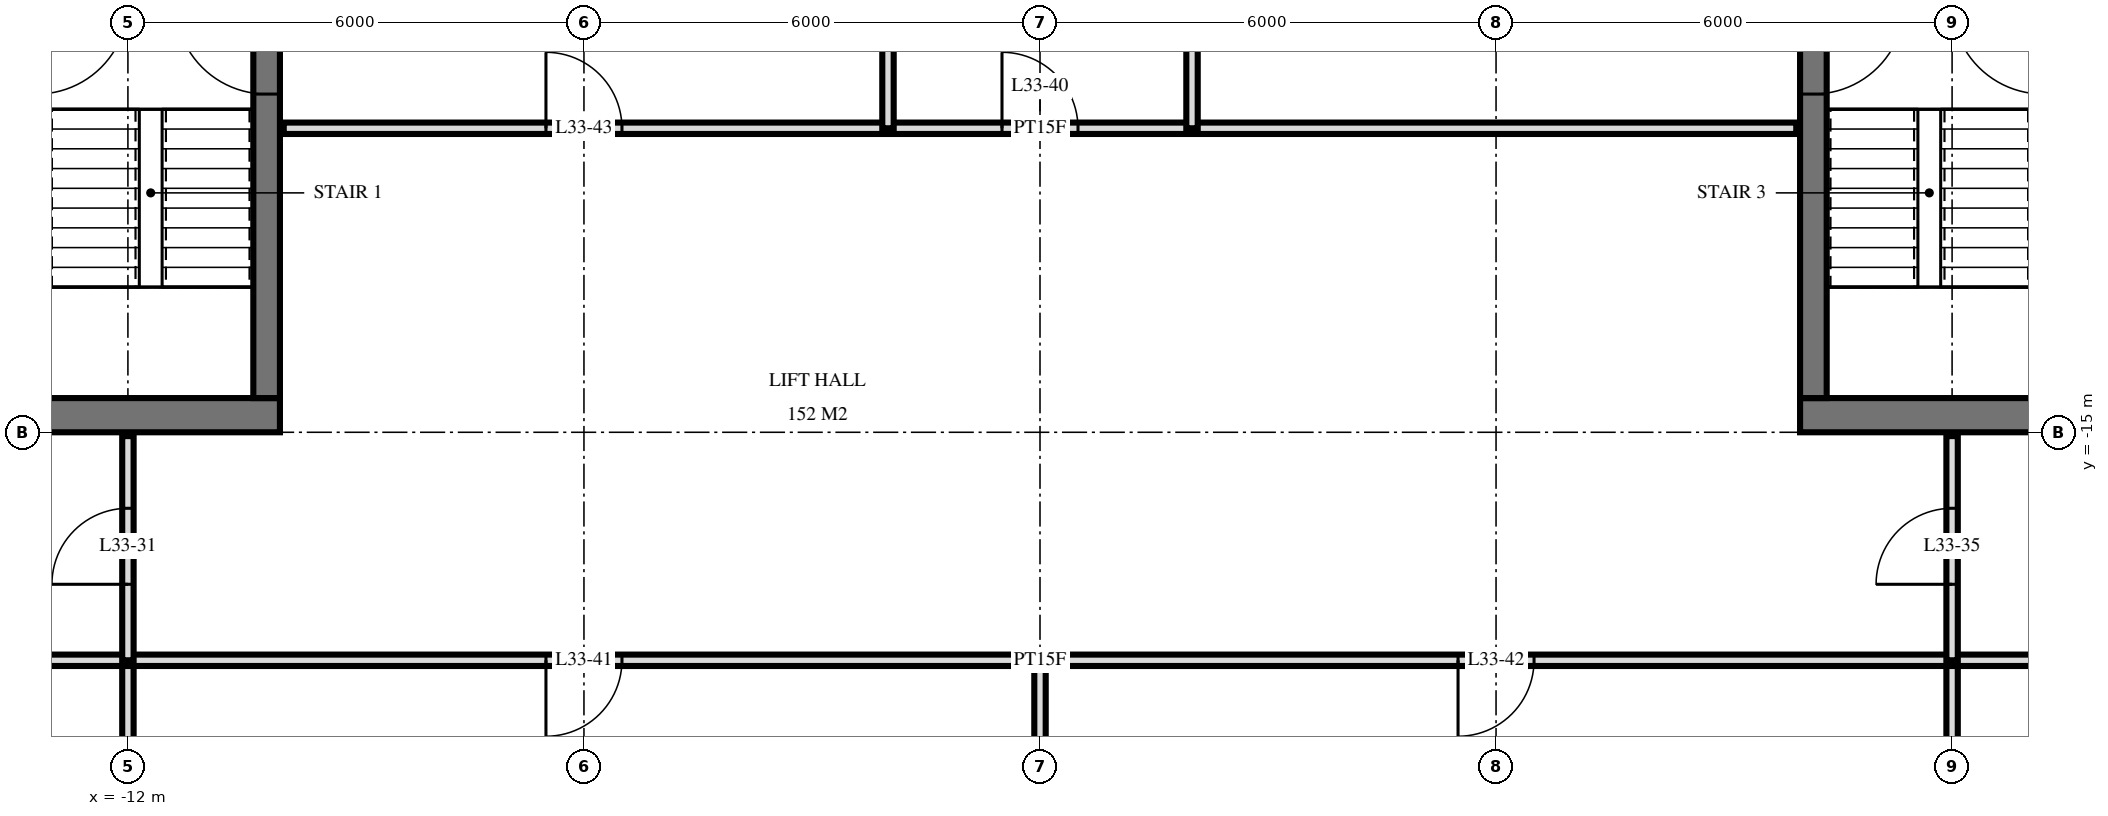
"""IFC4 building model, lengths in metres.
Left out: names, types, materials, properties, quantities, classifications, styles, units other than length and angle.
Written with IfcOpenShell. Run it as: python <this file> out.ifc"""

import sys

from ifc_helpers import new_model, si_unit, direction, frame, frame_2d, origin, place, context, subcontext, project, spatial, rectangle, extrude, element, fill, save


model = new_model("IFC4")
c1 = context("Model", 3, precision=1e-05, world=origin(), true_north=direction((0.0, 1.0)))
c2 = subcontext(c1, "Body", "Model", "MODEL_VIEW")
j1 = project(units=[si_unit("LENGTHUNIT", "METRE"), si_unit("PLANEANGLEUNIT", "RADIAN")], contexts=[c1])
p1 = place(None, origin())
s1 = spatial("IfcSite", under=j1, at=p1, CompositionType="ELEMENT")
p2 = place(p1, origin())
s2 = spatial("IfcBuilding", under=s1, at=p2, CompositionType="ELEMENT")
p3 = place(p2, frame((0.0, 0.0, 130.8)))
s3 = spatial("IfcBuildingStorey", under=s2, at=p3, CompositionType="ELEMENT", Elevation=130.8)
p4 = place(p3, frame((-24.5, -14.775, 0.0), z_axis=(0.0, 0.0, 1.0), x_axis=(1.0, 0.0, 0.0)))
e1 = element("IfcWall", 1, at=p4, inside=s3, PredefinedType="SHEAR", context=c2, shape_type="SweptSolid", body=[
    extrude(rectangle(XDim=14.5, YDim=0.45, at=frame_2d((7.25, 0.0))), origin(), (0.0, 0.0, 1.0), 3.6),
])
p5 = place(p4, frame((6.2, 0.0, 0.0)))
e2 = element("IfcOpeningElement", 2, at=p5, cuts=e1, PredefinedType="OPENING", context=c2, shape_type="SweptSolid", body=[
    extrude(rectangle(XDim=1.2, YDim=2.1, at=frame_2d((0.6, 1.05))), frame((0.0, 0.235, 0.0), z_axis=(0.0, -1.0, 0.0), x_axis=(1.0, 0.0, 0.0)), (0.0, 0.0, 1.0), 0.47),
])
p6 = place(p4, frame((9.25, 0.0, 0.0)))
e3 = element("IfcOpeningElement", 3, at=p6, cuts=e1, PredefinedType="OPENING", context=c2, shape_type="SweptSolid", body=[
    extrude(rectangle(XDim=1.1, YDim=2.1, at=frame_2d((0.55, 1.05))), frame((0.0, 0.235, 0.0), z_axis=(0.0, -1.0, 0.0), x_axis=(1.0, 0.0, 0.0)), (0.0, 0.0, 1.0), 0.47),
])
p7 = place(p4, frame((3.5, 0.0, 0.0)))
e4 = element("IfcOpeningElement", 4, at=p7, cuts=e1, PredefinedType="OPENING", context=c2, shape_type="SweptSolid", body=[
    extrude(rectangle(XDim=0.9, YDim=2.1, at=frame_2d((0.45, 1.05))), frame((0.0, 0.235, 0.0), z_axis=(0.0, -1.0, 0.0), x_axis=(1.0, 0.0, 0.0)), (0.0, 0.0, 1.0), 0.47),
])
p8 = place(p4, frame((1.05, 0.0, 0.0)))
e5 = element("IfcOpeningElement", 5, at=p8, cuts=e1, PredefinedType="OPENING", context=c2, shape_type="SweptSolid", body=[
    extrude(rectangle(XDim=1.0, YDim=2.1, at=frame_2d((0.5, 1.05))), frame((0.0, 0.235, 0.0), z_axis=(0.0, -1.0, 0.0), x_axis=(1.0, 0.0, 0.0)), (0.0, 0.0, 1.0), 0.47),
])
p9 = place(p3, frame((-10.175, -14.55, 0.0), z_axis=(0.0, 0.0, 1.0), x_axis=(0.0, 1.0, 0.0)))
e6 = element("IfcWall", 6, at=p9, inside=s3, PredefinedType="SHEAR", context=c2, shape_type="SweptSolid", body=[
    extrude(rectangle(XDim=14.1, YDim=0.35, at=frame_2d((7.05, 0.0))), origin(), (0.0, 0.0, 1.0), 3.6),
])
p10 = place(p9, frame((8.4, 0.0, 0.0)))
e7 = element("IfcOpeningElement", 7, at=p10, cuts=e6, PredefinedType="OPENING", context=c2, shape_type="SweptSolid", body=[
    extrude(rectangle(XDim=1.4, YDim=2.4, at=frame_2d((0.7, 1.2))), frame((0.0, 0.185, 0.0), z_axis=(0.0, -1.0, 0.0), x_axis=(1.0, 0.0, 0.0)), (0.0, 0.0, 1.0), 0.37),
])
p11 = place(p9, frame((10.0, 0.0, 0.0)))
e8 = element("IfcOpeningElement", 8, at=p11, cuts=e6, PredefinedType="OPENING", context=c2, shape_type="SweptSolid", body=[
    extrude(rectangle(XDim=1.4, YDim=2.4, at=frame_2d((0.7, 1.2))), frame((0.0, 0.185, 0.0), z_axis=(0.0, -1.0, 0.0), x_axis=(1.0, 0.0, 0.0)), (0.0, 0.0, 1.0), 0.37),
])
p12 = place(p9, frame((4.0, 0.0, 0.0)))
e9 = element("IfcOpeningElement", 9, at=p12, cuts=e6, PredefinedType="OPENING", context=c2, shape_type="SweptSolid", body=[
    extrude(rectangle(XDim=1.2, YDim=2.1, at=frame_2d((0.6, 1.05))), frame((0.0, 0.185, 0.0), z_axis=(0.0, -1.0, 0.0), x_axis=(1.0, 0.0, 0.0)), (0.0, 0.0, 1.0), 0.37),
])
p13 = place(p3, frame((10.0, -14.775, 0.0), z_axis=(0.0, 0.0, 1.0), x_axis=(1.0, 0.0, 0.0)))
e10 = element("IfcWall", 10, at=p13, inside=s3, PredefinedType="SHEAR", context=c2, shape_type="SweptSolid", body=[
    extrude(rectangle(XDim=14.5, YDim=0.45, at=frame_2d((7.25, 0.0))), origin(), (0.0, 0.0, 1.0), 3.6),
])
p14 = place(p13, frame((7.1, 0.0, 0.0)))
e11 = element("IfcOpeningElement", 11, at=p14, cuts=e10, PredefinedType="OPENING", context=c2, shape_type="SweptSolid", body=[
    extrude(rectangle(XDim=1.2, YDim=2.1, at=frame_2d((0.6, 1.05))), frame((0.0, 0.235, 0.0), z_axis=(0.0, -1.0, 0.0), x_axis=(1.0, 0.0, 0.0)), (0.0, 0.0, 1.0), 0.47),
])
p15 = place(p13, frame((4.15, 0.0, 0.0)))
e12 = element("IfcOpeningElement", 12, at=p15, cuts=e10, PredefinedType="OPENING", context=c2, shape_type="SweptSolid", body=[
    extrude(rectangle(XDim=1.1, YDim=2.1, at=frame_2d((0.55, 1.05))), frame((0.0, 0.235, 0.0), z_axis=(0.0, -1.0, 0.0), x_axis=(1.0, 0.0, 0.0)), (0.0, 0.0, 1.0), 0.47),
])
p16 = place(p13, frame((10.1, 0.0, 0.0)))
e13 = element("IfcOpeningElement", 13, at=p16, cuts=e10, PredefinedType="OPENING", context=c2, shape_type="SweptSolid", body=[
    extrude(rectangle(XDim=0.9, YDim=2.1, at=frame_2d((0.45, 1.05))), frame((0.0, 0.235, 0.0), z_axis=(0.0, -1.0, 0.0), x_axis=(1.0, 0.0, 0.0)), (0.0, 0.0, 1.0), 0.47),
])
p17 = place(p13, frame((12.45, 0.0, 0.0)))
e14 = element("IfcOpeningElement", 14, at=p17, cuts=e10, PredefinedType="OPENING", context=c2, shape_type="SweptSolid", body=[
    extrude(rectangle(XDim=1.0, YDim=2.1, at=frame_2d((0.5, 1.05))), frame((0.0, 0.235, 0.0), z_axis=(0.0, -1.0, 0.0), x_axis=(1.0, 0.0, 0.0)), (0.0, 0.0, 1.0), 0.47),
])
p18 = place(p3, frame((10.175, -14.55, 0.0), z_axis=(0.0, 0.0, 1.0), x_axis=(0.0, 1.0, 0.0)))
e15 = element("IfcWall", 15, at=p18, inside=s3, PredefinedType="SHEAR", context=c2, shape_type="SweptSolid", body=[
    extrude(rectangle(XDim=14.1, YDim=0.35, at=frame_2d((7.05, 0.0))), origin(), (0.0, 0.0, 1.0), 3.6),
])
p19 = place(p18, frame((8.4, 0.0, 0.0)))
e16 = element("IfcOpeningElement", 16, at=p19, cuts=e15, PredefinedType="OPENING", context=c2, shape_type="SweptSolid", body=[
    extrude(rectangle(XDim=1.4, YDim=2.4, at=frame_2d((0.7, 1.2))), frame((0.0, 0.185, 0.0), z_axis=(0.0, -1.0, 0.0), x_axis=(1.0, 0.0, 0.0)), (0.0, 0.0, 1.0), 0.37),
])
p20 = place(p18, frame((10.0, 0.0, 0.0)))
e17 = element("IfcOpeningElement", 17, at=p20, cuts=e15, PredefinedType="OPENING", context=c2, shape_type="SweptSolid", body=[
    extrude(rectangle(XDim=1.4, YDim=2.4, at=frame_2d((0.7, 1.2))), frame((0.0, 0.185, 0.0), z_axis=(0.0, -1.0, 0.0), x_axis=(1.0, 0.0, 0.0)), (0.0, 0.0, 1.0), 0.37),
])
p21 = place(p18, frame((4.0, 0.0, 0.0)))
e18 = element("IfcOpeningElement", 18, at=p21, cuts=e15, PredefinedType="OPENING", context=c2, shape_type="SweptSolid", body=[
    extrude(rectangle(XDim=1.2, YDim=2.1, at=frame_2d((0.6, 1.05))), frame((0.0, 0.185, 0.0), z_axis=(0.0, -1.0, 0.0), x_axis=(1.0, 0.0, 0.0)), (0.0, 0.0, 1.0), 0.37),
])
p22 = place(p3, frame((12.0, -18.0, 0.0), z_axis=(0.0, 0.0, 1.0), x_axis=(0.0, 1.0, 0.0)))
e19 = element("IfcWall", 19, at=p22, inside=s3, PredefinedType="PARTITIONING", context=c2, shape_type="SweptSolid", body=[
    extrude(rectangle(XDim=2.95, YDim=0.15, at=frame_2d((1.475, 0.0))), origin(), (0.0, 0.0, 1.0), 3.32),
])
p23 = place(p22, frame((1.0, 0.0, 0.0)))
e20 = element("IfcOpeningElement", 20, at=p23, cuts=e19, PredefinedType="OPENING", context=c2, shape_type="SweptSolid", body=[
    extrude(rectangle(XDim=1.0, YDim=2.1, at=frame_2d((0.5, 1.05))), frame((0.0, 0.085, 0.0), z_axis=(0.0, -1.0, 0.0), x_axis=(1.0, 0.0, 0.0)), (0.0, 0.0, 1.0), 0.17),
])
p24 = place(p3, frame((12.0, -33.62, 0.0), z_axis=(0.0, 0.0, 1.0), x_axis=(0.0, 1.0, 0.0)))
e21 = element("IfcWall", 21, at=p24, inside=s3, PredefinedType="PARTITIONING", context=c2, shape_type="SweptSolid", body=[
    extrude(rectangle(XDim=15.62, YDim=0.15, at=frame_2d((7.81, 0.0))), origin(), (0.0, 0.0, 1.0), 3.32),
])
p25 = place(p3, frame((2.0, -11.0, 0.0), z_axis=(0.0, 0.0, 1.0), x_axis=(0.0, 1.0, 0.0)))
e22 = element("IfcWall", 22, at=p25, inside=s3, PredefinedType="PARTITIONING", context=c2, shape_type="SweptSolid", body=[
    extrude(rectangle(XDim=4.0, YDim=0.15, at=frame_2d((2.0, 0.0))), origin(), (0.0, 0.0, 1.0), 3.32),
])
p26 = place(p3, frame((0.0, -33.62, 0.0), z_axis=(0.0, 0.0, 1.0), x_axis=(0.0, 1.0, 0.0)))
e23 = element("IfcWall", 23, at=p26, inside=s3, PredefinedType="PARTITIONING", context=c2, shape_type="SweptSolid", body=[
    extrude(rectangle(XDim=15.62, YDim=0.15, at=frame_2d((7.81, 0.0))), origin(), (0.0, 0.0, 1.0), 3.32),
])
p27 = place(p3, frame((-2.0, -11.0, 0.0), z_axis=(0.0, 0.0, 1.0), x_axis=(0.0, 1.0, 0.0)))
e24 = element("IfcWall", 24, at=p27, inside=s3, PredefinedType="PARTITIONING", context=c2, shape_type="SweptSolid", body=[
    extrude(rectangle(XDim=4.0, YDim=0.15, at=frame_2d((2.0, 0.0))), origin(), (0.0, 0.0, 1.0), 3.32),
])
p28 = place(p3, frame((-12.0, -18.0, 0.0), z_axis=(0.0, 0.0, 1.0), x_axis=(0.0, 1.0, 0.0)))
e25 = element("IfcWall", 25, at=p28, inside=s3, PredefinedType="PARTITIONING", context=c2, shape_type="SweptSolid", body=[
    extrude(rectangle(XDim=2.95, YDim=0.15, at=frame_2d((1.475, 0.0))), origin(), (0.0, 0.0, 1.0), 3.32),
])
p29 = place(p28, frame((1.0, 0.0, 0.0)))
e26 = element("IfcOpeningElement", 26, at=p29, cuts=e25, PredefinedType="OPENING", context=c2, shape_type="SweptSolid", body=[
    extrude(rectangle(XDim=1.0, YDim=2.1, at=frame_2d((0.5, 1.05))), frame((0.0, 0.085, 0.0), z_axis=(0.0, -1.0, 0.0), x_axis=(1.0, 0.0, 0.0)), (0.0, 0.0, 1.0), 0.17),
])
p30 = place(p3, frame((-12.0, -33.62, 0.0), z_axis=(0.0, 0.0, 1.0), x_axis=(0.0, 1.0, 0.0)))
e27 = element("IfcWall", 27, at=p30, inside=s3, PredefinedType="PARTITIONING", context=c2, shape_type="SweptSolid", body=[
    extrude(rectangle(XDim=15.62, YDim=0.15, at=frame_2d((7.81, 0.0))), origin(), (0.0, 0.0, 1.0), 3.32),
])
p31 = place(p3, frame((-28.02, -18.0, 0.0), z_axis=(0.0, 0.0, 1.0), x_axis=(1.0, 0.0, 0.0)))
e28 = element("IfcWall", 28, at=p31, inside=s3, PredefinedType="PARTITIONING", context=c2, shape_type="SweptSolid", body=[
    extrude(rectangle(XDim=56.04, YDim=0.15, at=frame_2d((28.02, 0.0))), origin(), (0.0, 0.0, 1.0), 3.32),
])
p32 = place(p31, frame((13.17, 0.0, 0.0)))
e29 = element("IfcOpeningElement", 29, at=p32, cuts=e28, PredefinedType="OPENING", context=c2, shape_type="SweptSolid", body=[
    extrude(rectangle(XDim=1.0, YDim=2.1, at=frame_2d((0.5, 1.05))), frame((0.0, 0.085, 0.0), z_axis=(0.0, -1.0, 0.0), x_axis=(1.0, 0.0, 0.0)), (0.0, 0.0, 1.0), 0.17),
])
p33 = place(p31, frame((11.32, 0.0, 0.0)))
e30 = element("IfcOpeningElement", 30, at=p33, cuts=e28, PredefinedType="OPENING", context=c2, shape_type="SweptSolid", body=[
    extrude(rectangle(XDim=1.0, YDim=2.1, at=frame_2d((0.5, 1.05))), frame((0.0, 0.085, 0.0), z_axis=(0.0, -1.0, 0.0), x_axis=(1.0, 0.0, 0.0)), (0.0, 0.0, 1.0), 0.17),
])
p34 = place(p31, frame((41.87, 0.0, 0.0)))
e31 = element("IfcOpeningElement", 31, at=p34, cuts=e28, PredefinedType="OPENING", context=c2, shape_type="SweptSolid", body=[
    extrude(rectangle(XDim=1.0, YDim=2.1, at=frame_2d((0.5, 1.05))), frame((0.0, 0.085, 0.0), z_axis=(0.0, -1.0, 0.0), x_axis=(1.0, 0.0, 0.0)), (0.0, 0.0, 1.0), 0.17),
])
p35 = place(p31, frame((43.17, 0.0, 0.0)))
e32 = element("IfcOpeningElement", 32, at=p35, cuts=e28, PredefinedType="OPENING", context=c2, shape_type="SweptSolid", body=[
    extrude(rectangle(XDim=1.0, YDim=2.1, at=frame_2d((0.5, 1.05))), frame((0.0, 0.085, 0.0), z_axis=(0.0, -1.0, 0.0), x_axis=(1.0, 0.0, 0.0)), (0.0, 0.0, 1.0), 0.17),
])
p36 = place(p31, frame((46.72, 0.0, 0.0)))
e33 = element("IfcOpeningElement", 33, at=p36, cuts=e28, PredefinedType="OPENING", context=c2, shape_type="SweptSolid", body=[
    extrude(rectangle(XDim=1.0, YDim=2.1, at=frame_2d((0.5, 1.05))), frame((0.0, 0.085, 0.0), z_axis=(0.0, -1.0, 0.0), x_axis=(1.0, 0.0, 0.0)), (0.0, 0.0, 1.0), 0.17),
])
p37 = place(p31, frame((21.52, 0.0, 0.0)))
e34 = element("IfcOpeningElement", 34, at=p37, cuts=e28, PredefinedType="OPENING", context=c2, shape_type="SweptSolid", body=[
    extrude(rectangle(XDim=1.0, YDim=2.1, at=frame_2d((0.5, 1.05))), frame((0.0, 0.085, 0.0), z_axis=(0.0, -1.0, 0.0), x_axis=(1.0, 0.0, 0.0)), (0.0, 0.0, 1.0), 0.17),
])
p38 = place(p31, frame((33.52, 0.0, 0.0)))
e35 = element("IfcOpeningElement", 35, at=p38, cuts=e28, PredefinedType="OPENING", context=c2, shape_type="SweptSolid", body=[
    extrude(rectangle(XDim=1.0, YDim=2.1, at=frame_2d((0.5, 1.05))), frame((0.0, 0.085, 0.0), z_axis=(0.0, -1.0, 0.0), x_axis=(1.0, 0.0, 0.0)), (0.0, 0.0, 1.0), 0.17),
])
p39 = place(p3, frame((-9.95, -11.0, 0.0), z_axis=(0.0, 0.0, 1.0), x_axis=(1.0, 0.0, 0.0)))
e36 = element("IfcWall", 36, at=p39, inside=s3, PredefinedType="PARTITIONING", context=c2, shape_type="SweptSolid", body=[
    extrude(rectangle(XDim=19.9, YDim=0.15, at=frame_2d((9.95, 0.0))), origin(), (0.0, 0.0, 1.0), 3.32),
])
p40 = place(p39, frame((9.45, 0.0, 0.0)))
e37 = element("IfcOpeningElement", 37, at=p40, cuts=e36, PredefinedType="OPENING", context=c2, shape_type="SweptSolid", body=[
    extrude(rectangle(XDim=1.0, YDim=2.1, at=frame_2d((0.5, 1.05))), frame((0.0, 0.085, 0.0), z_axis=(0.0, -1.0, 0.0), x_axis=(1.0, 0.0, 0.0)), (0.0, 0.0, 1.0), 0.17),
])
p41 = place(p39, frame((3.45, 0.0, 0.0)))
e38 = element("IfcOpeningElement", 38, at=p41, cuts=e36, PredefinedType="OPENING", context=c2, shape_type="SweptSolid", body=[
    extrude(rectangle(XDim=1.0, YDim=2.1, at=frame_2d((0.5, 1.05))), frame((0.0, 0.085, 0.0), z_axis=(0.0, -1.0, 0.0), x_axis=(1.0, 0.0, 0.0)), (0.0, 0.0, 1.0), 0.17),
])
p42 = place(p12, origin())
e39 = element("IfcDoor", 39, at=p42, inside=s3, OperationType="SINGLE_SWING_LEFT", PredefinedType="DOOR", context=c2, shape_type="SweptSolid", body=[
    extrude(rectangle(XDim=1.2, YDim=2.1, at=frame_2d((0.6, 1.05))), frame((0.0, 0.025, 0.0), z_axis=(0.0, -1.0, 0.0), x_axis=(1.0, 0.0, 0.0)), (0.0, 0.0, 1.0), 0.05),
])
fill(e9, e39)
p43 = place(p21, frame((0.6, 0.0, 0.0), z_axis=(0.0, 0.0, 1.0), x_axis=(-1.0, 0.0, 0.0)))
e40 = element("IfcDoor", 40, at=p43, inside=s3, OperationType="SINGLE_SWING_RIGHT", PredefinedType="DOOR", context=c2, shape_type="SweptSolid", body=[
    extrude(rectangle(XDim=1.2, YDim=2.1, at=frame_2d((0.0, 1.05))), frame((0.0, -0.025, 0.0), z_axis=(0.0, 1.0, 0.0), x_axis=(-1.0, 0.0, 0.0)), (0.0, 0.0, 1.0), 0.05),
])
fill(e18, e40)
p44 = place(p29, origin())
e41 = element("IfcDoor", 41, at=p44, inside=s3, OperationType="SINGLE_SWING_RIGHT", PredefinedType="DOOR", context=c2, shape_type="SweptSolid", body=[
    extrude(rectangle(XDim=1.0, YDim=2.1, at=frame_2d((0.5, 1.05))), frame((0.0, 0.025, 0.0), z_axis=(0.0, -1.0, 0.0), x_axis=(1.0, 0.0, 0.0)), (0.0, 0.0, 1.0), 0.05),
])
fill(e26, e41)
p45 = place(p23, origin())
e42 = element("IfcDoor", 42, at=p45, inside=s3, OperationType="SINGLE_SWING_RIGHT", PredefinedType="DOOR", context=c2, shape_type="SweptSolid", body=[
    extrude(rectangle(XDim=1.0, YDim=2.1, at=frame_2d((0.5, 1.05))), frame((0.0, 0.025, 0.0), z_axis=(0.0, -1.0, 0.0), x_axis=(1.0, 0.0, 0.0)), (0.0, 0.0, 1.0), 0.05),
])
fill(e20, e42)
p46 = place(p40, origin())
e43 = element("IfcDoor", 43, at=p46, inside=s3, OperationType="SINGLE_SWING_RIGHT", PredefinedType="DOOR", context=c2, shape_type="SweptSolid", body=[
    extrude(rectangle(XDim=1.0, YDim=2.1, at=frame_2d((0.5, 1.05))), frame((0.0, 0.025, 0.0), z_axis=(0.0, -1.0, 0.0), x_axis=(1.0, 0.0, 0.0)), (0.0, 0.0, 1.0), 0.05),
])
fill(e37, e43)
p47 = place(p37, frame((0.5, 0.0, 0.0), z_axis=(0.0, 0.0, 1.0), x_axis=(-1.0, 0.0, 0.0)))
e44 = element("IfcDoor", 44, at=p47, inside=s3, OperationType="SINGLE_SWING_LEFT", PredefinedType="DOOR", context=c2, shape_type="SweptSolid", body=[
    extrude(rectangle(XDim=1.0, YDim=2.1, at=frame_2d((0.0, 1.05))), frame((0.0, -0.025, 0.0), z_axis=(0.0, 1.0, 0.0), x_axis=(-1.0, 0.0, 0.0)), (0.0, 0.0, 1.0), 0.05),
])
fill(e34, e44)
p48 = place(p38, frame((0.5, 0.0, 0.0), z_axis=(0.0, 0.0, 1.0), x_axis=(-1.0, 0.0, 0.0)))
e45 = element("IfcDoor", 45, at=p48, inside=s3, OperationType="SINGLE_SWING_LEFT", PredefinedType="DOOR", context=c2, shape_type="SweptSolid", body=[
    extrude(rectangle(XDim=1.0, YDim=2.1, at=frame_2d((0.0, 1.05))), frame((0.0, -0.025, 0.0), z_axis=(0.0, 1.0, 0.0), x_axis=(-1.0, 0.0, 0.0)), (0.0, 0.0, 1.0), 0.05),
])
fill(e35, e45)
p49 = place(p41, origin())
e46 = element("IfcDoor", 46, at=p49, inside=s3, OperationType="SINGLE_SWING_RIGHT", PredefinedType="DOOR", context=c2, shape_type="SweptSolid", body=[
    extrude(rectangle(XDim=1.0, YDim=2.1, at=frame_2d((0.5, 1.05))), frame((0.0, 0.025, 0.0), z_axis=(0.0, -1.0, 0.0), x_axis=(1.0, 0.0, 0.0)), (0.0, 0.0, 1.0), 0.05),
])
fill(e38, e46)
save(model, sys.argv[1])
